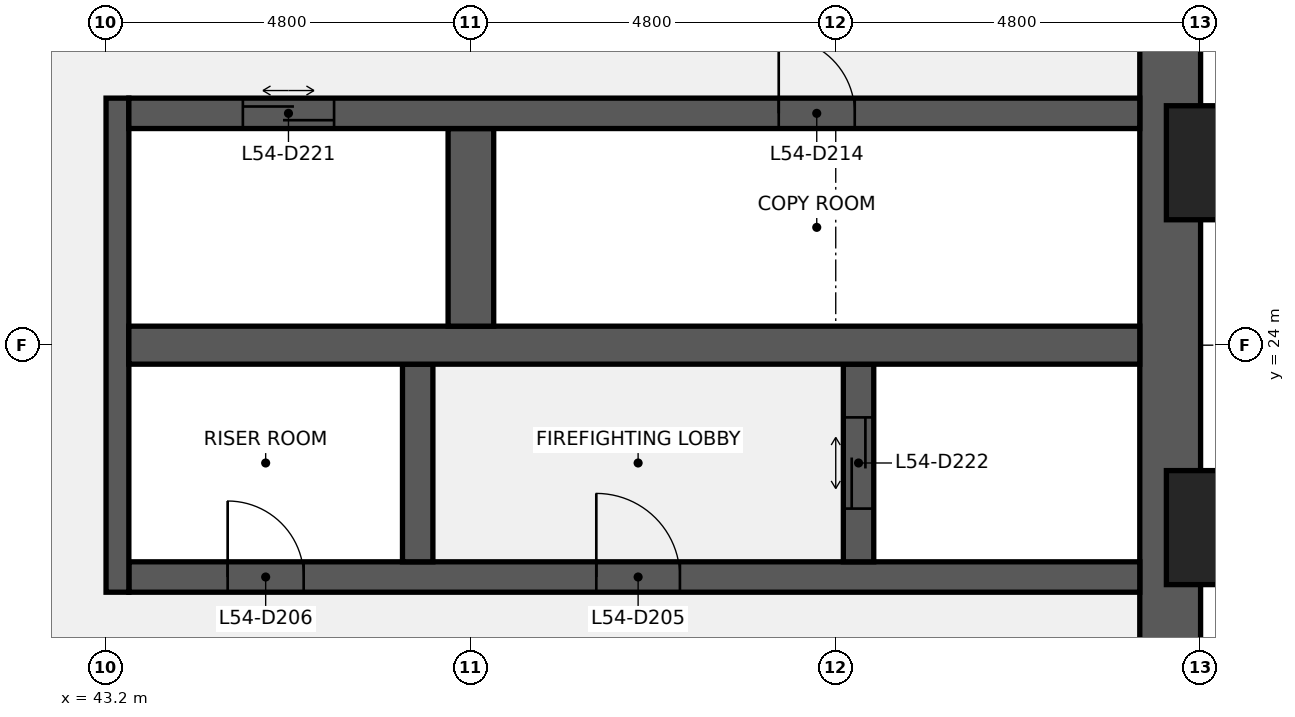
"""IFC4 building model, lengths in metres.
Left out: names, types, materials, properties, quantities, classifications, styles, units other than length and angle.
Written with IfcOpenShell. Run it as: python <this file> out.ifc"""

import sys

from ifc_helpers import new_model, si_unit, direction, frame, frame_2d, origin, origin_2d, place, context, subcontext, project, spatial, rectangle, extrude, element, fill, save


model = new_model("IFC4")
c1 = context("Model", 3, precision=1e-05, world=origin(), true_north=direction((0.0, 1.0)))
c2 = subcontext(c1, "Body", "Model", "MODEL_VIEW")
j1 = project(units=[si_unit("LENGTHUNIT", "METRE"), si_unit("PLANEANGLEUNIT", "RADIAN")], contexts=[c1])
p1 = place(None, origin())
s1 = spatial("IfcSite", under=j1, at=p1, CompositionType="ELEMENT")
p2 = place(p1, origin())
s2 = spatial("IfcBuilding", under=s1, at=p2, CompositionType="ELEMENT")
p3 = place(p2, frame((0.0, 0.0, 245.2)))
s3 = spatial("IfcBuildingStorey", under=s2, at=p3, CompositionType="ELEMENT", Elevation=245.2)
p4 = place(p3, frame((57.2, 38.4, 0.0), z_axis=(0.0, 0.0, 1.0), x_axis=(0.0, -1.0, 0.0)))
e1 = element("IfcWall", 1, at=p4, inside=s3, PredefinedType="SHEAR", context=c2, shape_type="SweptSolid", body=[
    extrude(rectangle(XDim=28.8, YDim=0.8, at=frame_2d((14.4, 0.0))), origin(), (0.0, 0.0, 1.0), 3.84),
])
p5 = place(p4, frame((18.45, 0.0, 0.9)))
e2 = element("IfcOpeningElement", 2, at=p5, cuts=e1, PredefinedType="OPENING", context=c2, shape_type="SweptSolid", body=[
    extrude(rectangle(XDim=1.5, YDim=1.5, at=frame_2d((0.75, 0.75))), frame((0.0, 0.41, 0.0), z_axis=(0.0, -1.0, 0.0), x_axis=(1.0, 0.0, 0.0)), (0.0, 0.0, 1.0), 0.82),
])
p6 = place(p4, frame((8.85, 0.0, 0.9)))
e3 = element("IfcOpeningElement", 3, at=p6, cuts=e1, PredefinedType="OPENING", context=c2, shape_type="SweptSolid", body=[
    extrude(rectangle(XDim=1.5, YDim=1.5, at=frame_2d((0.75, 0.75))), frame((0.0, 0.41, 0.0), z_axis=(0.0, -1.0, 0.0), x_axis=(1.0, 0.0, 0.0)), (0.0, 0.0, 1.0), 0.82),
])
p7 = place(p3, frame((43.5, 20.95, 0.0), z_axis=(0.0, 0.0, 1.0), x_axis=(1.0, 0.0, 0.0)))
e4 = element("IfcWall", 4, at=p7, inside=s3, PredefinedType="SHEAR", context=c2, shape_type="SweptSolid", body=[
    extrude(rectangle(XDim=13.3, YDim=0.4, at=frame_2d((6.65, 0.0))), origin(), (0.0, 0.0, 1.0), 3.84),
])
p8 = place(p7, frame((6.15, 0.0, 0.0)))
e5 = element("IfcOpeningElement", 5, at=p8, cuts=e4, PredefinedType="OPENING", context=c2, shape_type="SweptSolid", body=[
    extrude(rectangle(XDim=1.1, YDim=2.1, at=frame_2d((0.55, 1.05))), frame((0.0, 0.21, 0.0), z_axis=(0.0, -1.0, 0.0), x_axis=(1.0, 0.0, 0.0)), (0.0, 0.0, 1.0), 0.42),
])
p9 = place(p7, frame((1.3, 0.0, 0.0)))
e6 = element("IfcOpeningElement", 6, at=p9, cuts=e4, PredefinedType="OPENING", context=c2, shape_type="SweptSolid", body=[
    extrude(rectangle(XDim=1.0, YDim=2.1, at=frame_2d((0.5, 1.05))), frame((0.0, 0.21, 0.0), z_axis=(0.0, -1.0, 0.0), x_axis=(1.0, 0.0, 0.0)), (0.0, 0.0, 1.0), 0.42),
])
p10 = place(p3, frame((43.35, 20.75, 0.0), z_axis=(0.0, 0.0, 1.0), x_axis=(0.0, 1.0, 0.0)))
e7 = element("IfcWall", 7, at=p10, inside=s3, PredefinedType="SHEAR", context=c2, shape_type="SweptSolid", body=[
    extrude(rectangle(XDim=6.5, YDim=0.3, at=frame_2d((3.25, 0.0))), origin(), (0.0, 0.0, 1.0), 3.84),
])
p11 = place(p3, frame((53.1, 21.15, 0.0), z_axis=(0.0, 0.0, 1.0), x_axis=(0.0, 1.0, 0.0)))
e8 = element("IfcWall", 8, at=p11, inside=s3, PredefinedType="SHEAR", context=c2, shape_type="SweptSolid", body=[
    extrude(rectangle(XDim=2.6, YDim=0.4, at=frame_2d((1.3, 0.0))), origin(), (0.0, 0.0, 1.0), 3.84),
])
p12 = place(p11, frame((0.7, 0.0, 0.0)))
e9 = element("IfcOpeningElement", 9, at=p12, cuts=e8, PredefinedType="OPENING", context=c2, shape_type="SweptSolid", body=[
    extrude(rectangle(XDim=1.2, YDim=2.1, at=frame_2d((0.6, 1.05))), frame((0.0, 0.21, 0.0), z_axis=(0.0, -1.0, 0.0), x_axis=(1.0, 0.0, 0.0)), (0.0, 0.0, 1.0), 0.42),
])
p13 = place(p3, frame((47.3, 21.15, 0.0), z_axis=(0.0, 0.0, 1.0), x_axis=(0.0, 1.0, 0.0)))
e10 = element("IfcWall", 10, at=p13, inside=s3, PredefinedType="SHEAR", context=c2, shape_type="SweptSolid", body=[
    extrude(rectangle(XDim=2.6, YDim=0.4, at=frame_2d((1.3, 0.0))), origin(), (0.0, 0.0, 1.0), 3.84),
])
p14 = place(p3, frame((43.5, 24.0, 0.0), z_axis=(0.0, 0.0, 1.0), x_axis=(1.0, 0.0, 0.0)))
e11 = element("IfcWall", 11, at=p14, inside=s3, PredefinedType="SHEAR", context=c2, shape_type="SweptSolid", body=[
    extrude(rectangle(XDim=13.3, YDim=0.5, at=frame_2d((6.65, 0.0))), origin(), (0.0, 0.0, 1.0), 3.84),
])
p15 = place(p3, frame((48.0, 24.25, 0.0), z_axis=(0.0, 0.0, 1.0), x_axis=(0.0, 1.0, 0.0)))
e12 = element("IfcWall", 12, at=p15, inside=s3, PredefinedType="SHEAR", context=c2, shape_type="SweptSolid", body=[
    extrude(rectangle(XDim=2.6, YDim=0.6, at=frame_2d((1.3, 0.0))), origin(), (0.0, 0.0, 1.0), 3.84),
])
p16 = place(p3, frame((43.5, 27.05, 0.0), z_axis=(0.0, 0.0, 1.0), x_axis=(1.0, 0.0, 0.0)))
e13 = element("IfcWall", 13, at=p16, inside=s3, PredefinedType="SHEAR", context=c2, shape_type="SweptSolid", body=[
    extrude(rectangle(XDim=13.3, YDim=0.4, at=frame_2d((6.65, 0.0))), origin(), (0.0, 0.0, 1.0), 3.84),
])
p17 = place(p16, frame((8.55, 0.0, 0.0)))
e14 = element("IfcOpeningElement", 14, at=p17, cuts=e13, PredefinedType="OPENING", context=c2, shape_type="SweptSolid", body=[
    extrude(rectangle(XDim=1.0, YDim=2.1, at=frame_2d((0.5, 1.05))), frame((0.0, 0.21, 0.0), z_axis=(0.0, -1.0, 0.0), x_axis=(1.0, 0.0, 0.0)), (0.0, 0.0, 1.0), 0.42),
])
p18 = place(p16, frame((1.5, 0.0, 0.0)))
e15 = element("IfcOpeningElement", 15, at=p18, cuts=e13, PredefinedType="OPENING", context=c2, shape_type="SweptSolid", body=[
    extrude(rectangle(XDim=1.2, YDim=2.1, at=frame_2d((0.6, 1.05))), frame((0.0, 0.21, 0.0), z_axis=(0.0, -1.0, 0.0), x_axis=(1.0, 0.0, 0.0)), (0.0, 0.0, 1.0), 0.42),
])
for number, where, z_axis, x_axis in (
    (16, (58.35, 21.6, 0.0), (0.0, 0.0, 1.0), (0.0, 1.0, 0.0)),
    (17, (58.35, 26.4, 0.0), (0.0, 0.0, 1.0), (0.0, 1.0, 0.0)),
):
    element("IfcColumn", number, at=place(p3, frame(where, z_axis=z_axis, x_axis=x_axis)), inside=s3, PredefinedType="PILASTER", context=c2, shape_type="SweptSolid", body=[
        extrude(rectangle(XDim=2.4, YDim=1.5, at=origin_2d()), origin(), (0.0, 0.0, 1.0), 4.0),
    ])
p19 = place(p8, origin())
e18 = element("IfcDoor", 18, at=p19, inside=s3, OperationType="SINGLE_SWING_LEFT", PredefinedType="DOOR", context=c2, shape_type="SweptSolid", body=[
    extrude(rectangle(XDim=1.1, YDim=2.1, at=frame_2d((0.55, 1.05))), frame((0.0, 0.025, 0.0), z_axis=(0.0, -1.0, 0.0), x_axis=(1.0, 0.0, 0.0)), (0.0, 0.0, 1.0), 0.05),
])
fill(e5, e18)
p20 = place(p9, origin())
e19 = element("IfcDoor", 19, at=p20, inside=s3, OperationType="SINGLE_SWING_LEFT", PredefinedType="DOOR", context=c2, shape_type="SweptSolid", body=[
    extrude(rectangle(XDim=1.0, YDim=2.1, at=frame_2d((0.5, 1.05))), frame((0.0, 0.025, 0.0), z_axis=(0.0, -1.0, 0.0), x_axis=(1.0, 0.0, 0.0)), (0.0, 0.0, 1.0), 0.05),
])
fill(e6, e19)
p21 = place(p17, origin())
e20 = element("IfcDoor", 20, at=p21, inside=s3, OperationType="SINGLE_SWING_LEFT", PredefinedType="DOOR", context=c2, shape_type="SweptSolid", body=[
    extrude(rectangle(XDim=1.0, YDim=2.1, at=frame_2d((0.5, 1.05))), frame((0.0, 0.025, 0.0), z_axis=(0.0, -1.0, 0.0), x_axis=(1.0, 0.0, 0.0)), (0.0, 0.0, 1.0), 0.05),
])
fill(e14, e20)
p22 = place(p18, origin())
e21 = element("IfcDoor", 21, at=p22, inside=s3, OperationType="DOUBLE_DOOR_SLIDING", PredefinedType="DOOR", context=c2, shape_type="SweptSolid", body=[
    extrude(rectangle(XDim=1.2, YDim=2.1, at=frame_2d((0.6, 1.05))), frame((0.0, 0.025, 0.0), z_axis=(0.0, -1.0, 0.0), x_axis=(1.0, 0.0, 0.0)), (0.0, 0.0, 1.0), 0.05),
])
fill(e15, e21)
p23 = place(p12, origin())
e22 = element("IfcDoor", 22, at=p23, inside=s3, OperationType="DOUBLE_DOOR_SLIDING", PredefinedType="DOOR", context=c2, shape_type="SweptSolid", body=[
    extrude(rectangle(XDim=1.2, YDim=2.1, at=frame_2d((0.6, 1.05))), frame((0.0, 0.025, 0.0), z_axis=(0.0, -1.0, 0.0), x_axis=(1.0, 0.0, 0.0)), (0.0, 0.0, 1.0), 0.05),
])
fill(e9, e22)
save(model, sys.argv[1])
